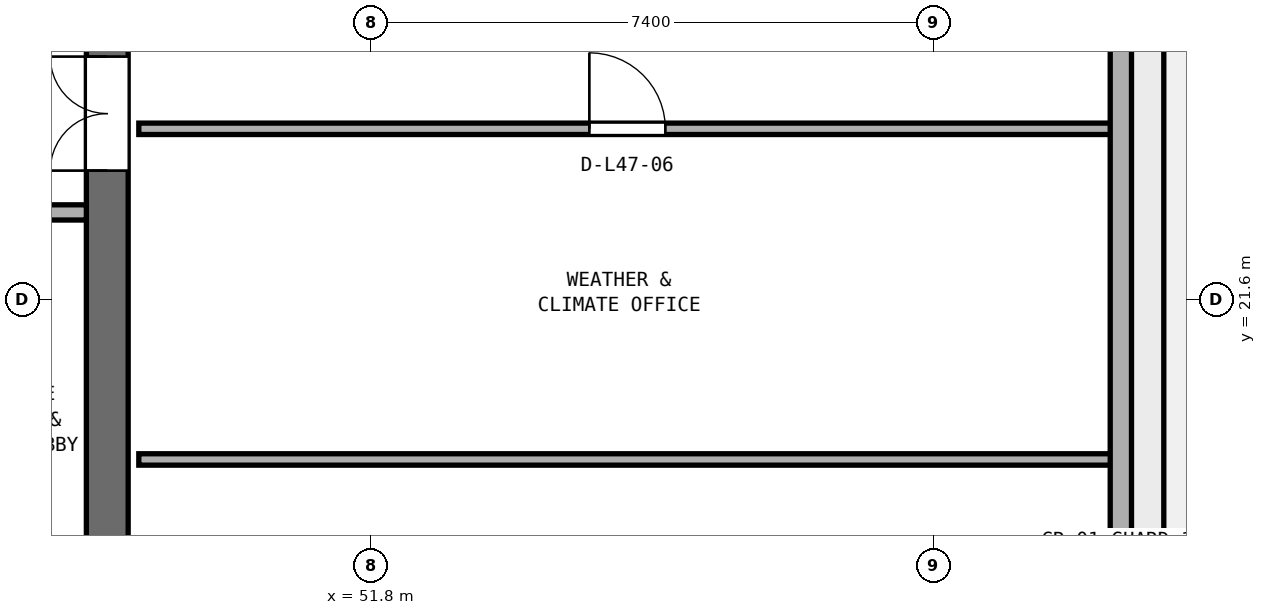
"""IFC4 building model, lengths in metres.
Left out: names, types, materials, properties, quantities, classifications, styles, units other than length and angle.
Written with IfcOpenShell. Run it as: python <this file> out.ifc"""

import sys

from ifc_helpers import new_model, si_unit, direction, frame, frame_2d, origin, place, context, subcontext, project, spatial, rectangle, extrude, element, fill, save


model = new_model("IFC4")
c1 = context("Model", 3, precision=1e-05, world=origin(), true_north=direction((0.0, 1.0)))
c2 = subcontext(c1, "Body", "Model", "MODEL_VIEW")
j1 = project(units=[si_unit("LENGTHUNIT", "METRE"), si_unit("PLANEANGLEUNIT", "RADIAN")], contexts=[c1])
p1 = place(None, origin())
s1 = spatial("IfcSite", under=j1, at=p1, CompositionType="ELEMENT")
p2 = place(p1, origin())
s2 = spatial("IfcBuilding", under=s1, at=p2, CompositionType="ELEMENT")
p3 = place(p2, frame((0.0, 0.0, 185.8)))
s3 = spatial("IfcBuildingStorey", under=s2, at=p3, CompositionType="ELEMENT", Elevation=185.8)
p4 = place(p3, frame((48.325, 17.55, 0.0), z_axis=(0.0, 0.0, 1.0), x_axis=(0.0, 1.0, 0.0)))
e1 = element("IfcWall", 1, at=p4, inside=s3, PredefinedType="SHEAR", context=c2, shape_type="SweptSolid", body=[
    extrude(rectangle(XDim=15.3, YDim=0.55, at=frame_2d((7.65, 0.0))), origin(), (0.0, 0.0, 1.0), 3.54),
])
p5 = place(p4, frame((5.75, 0.0, 0.0)))
e2 = element("IfcOpeningElement", 2, at=p5, cuts=e1, PredefinedType="OPENING", context=c2, shape_type="SweptSolid", body=[
    extrude(rectangle(XDim=1.5, YDim=2.15, at=frame_2d((0.75, 1.075))), frame((0.0, 0.285, 0.0), z_axis=(0.0, -1.0, 0.0), x_axis=(1.0, 0.0, 0.0)), (0.0, 0.0, 1.0), 0.57),
])
p6 = place(p3, frame((42.0, 22.75, 0.0), z_axis=(0.0, 0.0, 1.0), x_axis=(1.0, 0.0, 0.0)))
e3 = element("IfcWall", 3, at=p6, inside=s3, PredefinedType="SOLIDWALL", context=c2, shape_type="SweptSolid", body=[
    extrude(rectangle(XDim=6.05, YDim=0.2, at=frame_2d((3.025, 0.0))), origin(), (0.0, 0.0, 1.0), 3.54),
])
p7 = place(p3, frame((48.74, 19.5, 0.0), z_axis=(0.0, 0.0, 1.0), x_axis=(1.0, 0.0, 0.0)))
e4 = element("IfcWall", 4, at=p7, inside=s3, PredefinedType="PARTITIONING", context=c2, shape_type="SweptSolid", body=[
    extrude(rectangle(XDim=12.855, YDim=0.15, at=frame_2d((6.427, 0.0))), origin(), (0.0, 0.0, 1.0), 3.54),
])
p8 = place(p3, frame((48.74, 23.85, 0.0), z_axis=(0.0, 0.0, 1.0), x_axis=(1.0, 0.0, 0.0)))
e5 = element("IfcWall", 5, at=p8, inside=s3, PredefinedType="PARTITIONING", context=c2, shape_type="SweptSolid", body=[
    extrude(rectangle(XDim=12.855, YDim=0.15, at=frame_2d((6.427, 0.0))), origin(), (0.0, 0.0, 1.0), 3.54),
])
p9 = place(p8, frame((5.927, 0.0, 0.0)))
e6 = element("IfcOpeningElement", 6, at=p9, cuts=e5, PredefinedType="OPENING", context=c2, shape_type="SweptSolid", body=[
    extrude(rectangle(XDim=1.0, YDim=2.12, at=frame_2d((0.5, 1.06))), frame((0.0, 0.085, 0.0), z_axis=(0.0, -1.0, 0.0), x_axis=(1.0, 0.0, 0.0)), (0.0, 0.0, 1.0), 0.17),
])
p10 = place(p3, frame((61.66, 16.369, 0.0), z_axis=(0.0, 0.0, 1.0), x_axis=(0.0, 1.0, 0.0)))
e7 = element("IfcWall", 7, at=p10, inside=s3, PredefinedType="STANDARD", context=c2, shape_type="SweptSolid", body=[
    extrude(rectangle(XDim=18.902, YDim=0.28, at=frame_2d((9.451, 0.0))), origin(), (0.0, 0.0, 1.0), 3.54),
])
p11 = place(p10, frame((8.601, 0.0, 0.0)))
e8 = element("IfcOpeningElement", 8, at=p11, cuts=e7, PredefinedType="OPENING", context=c2, shape_type="SweptSolid", body=[
    extrude(rectangle(XDim=1.1, YDim=2.2, at=frame_2d((0.55, 1.1))), frame((0.0, 0.15, 0.0), z_axis=(0.0, -1.0, 0.0), x_axis=(1.0, 0.0, 0.0)), (0.0, 0.0, 1.0), 0.3),
])
p12 = place(p10, frame((14.219, 0.0, 0.9)))
e9 = element("IfcOpeningElement", 9, at=p12, cuts=e7, PredefinedType="OPENING", context=c2, shape_type="SweptSolid", body=[
    extrude(rectangle(XDim=2.4, YDim=1.75, at=frame_2d((1.2, 0.875))), frame((0.0, 0.15, 0.0), z_axis=(0.0, -1.0, 0.0), x_axis=(1.0, 0.0, 0.0)), (0.0, 0.0, 1.0), 0.3),
])
p13 = place(p5, origin())
e10 = element("IfcDoor", 10, at=p13, inside=s3, OperationType="DOUBLE_DOOR_SINGLE_SWING", PredefinedType="DOOR", context=c2, shape_type="SweptSolid", body=[
    extrude(rectangle(XDim=1.5, YDim=2.15, at=frame_2d((0.75, 1.075))), frame((0.0, 0.025, 0.0), z_axis=(0.0, -1.0, 0.0), x_axis=(1.0, 0.0, 0.0)), (0.0, 0.0, 1.0), 0.05),
])
fill(e2, e10)
p14 = place(p9, origin())
e11 = element("IfcDoor", 11, at=p14, inside=s3, OperationType="SINGLE_SWING_LEFT", PredefinedType="DOOR", context=c2, shape_type="SweptSolid", body=[
    extrude(rectangle(XDim=1.0, YDim=2.12, at=frame_2d((0.5, 1.06))), frame((0.0, 0.025, 0.0), z_axis=(0.0, -1.0, 0.0), x_axis=(1.0, 0.0, 0.0)), (0.0, 0.0, 1.0), 0.05),
])
fill(e6, e11)
save(model, sys.argv[1])
